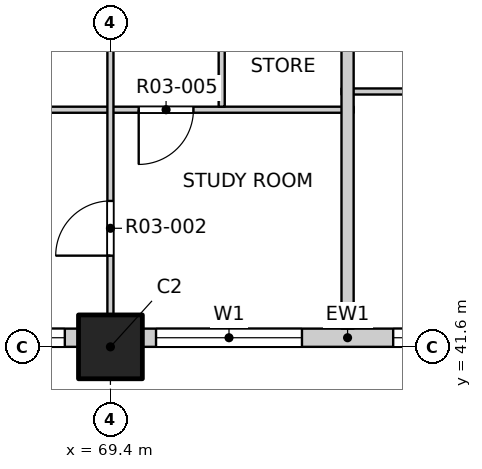
"""IFC4 building model, lengths in metres.
Left out: names, types, materials, properties, quantities, classifications, styles, units other than length and angle.
Written with IfcOpenShell. Run it as: python <this file> out.ifc"""

import sys

from ifc_helpers import new_model, si_unit, direction, frame, frame_2d, origin, origin_2d, place, context, subcontext, project, spatial, rectangle, extrude, element, fill, save


model = new_model("IFC4")
c1 = context("Model", 3, precision=1e-05, world=origin(), true_north=direction((0.0, 1.0)))
c2 = subcontext(c1, "Body", "Model", "MODEL_VIEW")
j1 = project(units=[si_unit("LENGTHUNIT", "METRE"), si_unit("PLANEANGLEUNIT", "RADIAN")], contexts=[c1])
p1 = place(None, origin())
s1 = spatial("IfcSite", under=j1, at=p1, CompositionType="ELEMENT")
p2 = place(p1, origin())
s2 = spatial("IfcBuilding", under=s1, at=p2, CompositionType="ELEMENT")
p3 = place(p2, frame((0.0, 0.0, 39.9)))
s3 = spatial("IfcBuildingStorey", under=s2, at=p3, CompositionType="ELEMENT", Elevation=39.9)
p4 = place(p3, frame((69.4, 41.6, -0.25), z_axis=(0.0, 0.0, 1.0), x_axis=(1.0, 0.0, 0.0)))
e1 = element("IfcColumn", 1, at=p4, inside=s3, PredefinedType="COLUMN", context=c2, shape_type="SweptSolid", body=[
    extrude(rectangle(XDim=1.05, YDim=1.05, at=origin_2d()), origin(), (0.0, 0.0, 1.0), 3.4),
])
p5 = place(p3, frame((65.5, 41.75, 0.0), z_axis=(0.0, 0.0, 1.0), x_axis=(1.0, 0.0, 0.0)))
e2 = element("IfcWall", 2, at=p5, inside=s3, PredefinedType="SOLIDWALL", context=c2, shape_type="SweptSolid", body=[
    extrude(rectangle(XDim=3.375, YDim=0.3, at=frame_2d((1.688, 0.0))), origin(), (0.0, 0.0, 1.0), 2.7),
])
p6 = place(p5, frame((0.75, 0.0, 0.9)))
e3 = element("IfcOpeningElement", 3, at=p6, cuts=e2, PredefinedType="OPENING", context=c2, shape_type="SweptSolid", body=[
    extrude(rectangle(XDim=2.4, YDim=1.8, at=frame_2d((1.2, 0.9))), frame((0.0, 0.16, 0.0), z_axis=(0.0, -1.0, 0.0), x_axis=(1.0, 0.0, 0.0)), (0.0, 0.0, 1.0), 0.32),
])
p7 = place(p3, frame((69.925, 41.75, 0.0), z_axis=(0.0, 0.0, 1.0), x_axis=(1.0, 0.0, 0.0)))
e4 = element("IfcWall", 4, at=p7, inside=s3, PredefinedType="SOLIDWALL", context=c2, shape_type="SweptSolid", body=[
    extrude(rectangle(XDim=6.75, YDim=0.3, at=frame_2d((3.375, 0.0))), origin(), (0.0, 0.0, 1.0), 2.7),
])
p8 = place(p7, frame((0.225, 0.0, 0.9)))
e5 = element("IfcOpeningElement", 5, at=p8, cuts=e4, PredefinedType="OPENING", context=c2, shape_type="SweptSolid", body=[
    extrude(rectangle(XDim=2.4, YDim=1.8, at=frame_2d((1.2, 0.9))), frame((0.0, 0.16, 0.0), z_axis=(0.0, -1.0, 0.0), x_axis=(1.0, 0.0, 0.0)), (0.0, 0.0, 1.0), 0.32),
])
p9 = place(p7, frame((4.125, 0.0, 0.9)))
e6 = element("IfcOpeningElement", 6, at=p9, cuts=e4, PredefinedType="OPENING", context=c2, shape_type="SweptSolid", body=[
    extrude(rectangle(XDim=2.4, YDim=1.8, at=frame_2d((1.2, 0.9))), frame((0.0, 0.16, 0.0), z_axis=(0.0, -1.0, 0.0), x_axis=(1.0, 0.0, 0.0)), (0.0, 0.0, 1.0), 0.32),
])
p10 = place(p3, frame((61.9, 45.5, 0.0), z_axis=(0.0, 0.0, 1.0), x_axis=(1.0, 0.0, 0.0)))
e7 = element("IfcWall", 7, at=p10, inside=s3, PredefinedType="PARTITIONING", context=c2, shape_type="SweptSolid", body=[
    extrude(rectangle(XDim=11.5, YDim=0.1, at=frame_2d((5.75, 0.0))), origin(), (0.0, 0.0, 1.0), 3.15),
])
p11 = place(p10, frame((7.965, 0.0, 0.0)))
e8 = element("IfcOpeningElement", 8, at=p11, cuts=e7, PredefinedType="OPENING", context=c2, shape_type="SweptSolid", body=[
    extrude(rectangle(XDim=0.9, YDim=2.1, at=frame_2d((0.45, 1.05))), frame((0.0, 0.06, 0.0), z_axis=(0.0, -1.0, 0.0), x_axis=(1.0, 0.0, 0.0)), (0.0, 0.0, 1.0), 0.12),
])
p12 = place(p3, frame((73.2, 45.8, 0.0), z_axis=(0.0, 0.0, 1.0), x_axis=(1.0, 0.0, 0.0)))
e9 = element("IfcWall", 9, at=p12, inside=s3, PredefinedType="PARTITIONING", context=c2, shape_type="SweptSolid", body=[
    extrude(rectangle(XDim=8.0, YDim=0.1, at=frame_2d((4.0, 0.0))), origin(), (0.0, 0.0, 1.0), 3.15),
])
p13 = place(p12, frame((1.45, 0.0, 0.0)))
e10 = element("IfcOpeningElement", 10, at=p13, cuts=e9, PredefinedType="OPENING", context=c2, shape_type="SweptSolid", body=[
    extrude(rectangle(XDim=1.2, YDim=2.1, at=frame_2d((0.6, 1.05))), frame((0.0, 0.06, 0.0), z_axis=(0.0, -1.0, 0.0), x_axis=(1.0, 0.0, 0.0)), (0.0, 0.0, 1.0), 0.12),
])
p14 = place(p12, frame((4.525, 0.0, 0.0)))
e11 = element("IfcOpeningElement", 11, at=p14, cuts=e9, PredefinedType="OPENING", context=c2, shape_type="SweptSolid", body=[
    extrude(rectangle(XDim=0.9, YDim=2.1, at=frame_2d((0.45, 1.05))), frame((0.0, 0.06, 0.0), z_axis=(0.0, -1.0, 0.0), x_axis=(1.0, 0.0, 0.0)), (0.0, 0.0, 1.0), 0.12),
])
p15 = place(p12, frame((6.475, 0.0, 0.0)))
e12 = element("IfcOpeningElement", 12, at=p15, cuts=e9, PredefinedType="OPENING", context=c2, shape_type="SweptSolid", body=[
    extrude(rectangle(XDim=0.9, YDim=2.1, at=frame_2d((0.45, 1.05))), frame((0.0, 0.06, 0.0), z_axis=(0.0, -1.0, 0.0), x_axis=(1.0, 0.0, 0.0)), (0.0, 0.0, 1.0), 0.12),
])
p16 = place(p3, frame((69.4, 41.9, 0.0), z_axis=(0.0, 0.0, 1.0), x_axis=(0.0, 1.0, 0.0)))
e13 = element("IfcWall", 13, at=p16, inside=s3, PredefinedType="PARTITIONING", context=c2, shape_type="SweptSolid", body=[
    extrude(rectangle(XDim=46.2, YDim=0.1, at=frame_2d((23.1, 0.0))), origin(), (0.0, 0.0, 1.0), 3.15),
])
p17 = place(p16, frame((1.2, 0.0, 0.0)))
e14 = element("IfcOpeningElement", 14, at=p17, cuts=e13, PredefinedType="OPENING", context=c2, shape_type="SweptSolid", body=[
    extrude(rectangle(XDim=0.9, YDim=2.1, at=frame_2d((0.45, 1.05))), frame((0.0, 0.06, 0.0), z_axis=(0.0, -1.0, 0.0), x_axis=(1.0, 0.0, 0.0)), (0.0, 0.0, 1.0), 0.12),
])
p18 = place(p16, frame((5.9, 0.0, 0.0)))
e15 = element("IfcOpeningElement", 15, at=p18, cuts=e13, PredefinedType="OPENING", context=c2, shape_type="SweptSolid", body=[
    extrude(rectangle(XDim=0.9, YDim=2.1, at=frame_2d((0.45, 1.05))), frame((0.0, 0.06, 0.0), z_axis=(0.0, -1.0, 0.0), x_axis=(1.0, 0.0, 0.0)), (0.0, 0.0, 1.0), 0.12),
])
p19 = place(p16, frame((9.0, 0.0, 0.0)))
e16 = element("IfcOpeningElement", 16, at=p19, cuts=e13, PredefinedType="OPENING", context=c2, shape_type="SweptSolid", body=[
    extrude(rectangle(XDim=0.9, YDim=2.1, at=frame_2d((0.45, 1.05))), frame((0.0, 0.06, 0.0), z_axis=(0.0, -1.0, 0.0), x_axis=(1.0, 0.0, 0.0)), (0.0, 0.0, 1.0), 0.12),
])
p20 = place(p16, frame((13.725, 0.0, 0.0)))
e17 = element("IfcOpeningElement", 17, at=p20, cuts=e13, PredefinedType="OPENING", context=c2, shape_type="SweptSolid", body=[
    extrude(rectangle(XDim=0.9, YDim=2.1, at=frame_2d((0.45, 1.05))), frame((0.0, 0.06, 0.0), z_axis=(0.0, -1.0, 0.0), x_axis=(1.0, 0.0, 0.0)), (0.0, 0.0, 1.0), 0.12),
])
p21 = place(p16, frame((17.775, 0.0, 0.0)))
e18 = element("IfcOpeningElement", 18, at=p21, cuts=e13, PredefinedType="OPENING", context=c2, shape_type="SweptSolid", body=[
    extrude(rectangle(XDim=0.9, YDim=2.1, at=frame_2d((0.45, 1.05))), frame((0.0, 0.06, 0.0), z_axis=(0.0, -1.0, 0.0), x_axis=(1.0, 0.0, 0.0)), (0.0, 0.0, 1.0), 0.12),
])
p22 = place(p16, frame((20.7, 0.0, 0.0)))
e19 = element("IfcOpeningElement", 19, at=p22, cuts=e13, PredefinedType="OPENING", context=c2, shape_type="SweptSolid", body=[
    extrude(rectangle(XDim=0.9, YDim=2.1, at=frame_2d((0.45, 1.05))), frame((0.0, 0.06, 0.0), z_axis=(0.0, -1.0, 0.0), x_axis=(1.0, 0.0, 0.0)), (0.0, 0.0, 1.0), 0.12),
])
p23 = place(p16, frame((25.575, 0.0, 0.0)))
e20 = element("IfcOpeningElement", 20, at=p23, cuts=e13, PredefinedType="OPENING", context=c2, shape_type="SweptSolid", body=[
    extrude(rectangle(XDim=0.9, YDim=2.1, at=frame_2d((0.45, 1.05))), frame((0.0, 0.06, 0.0), z_axis=(0.0, -1.0, 0.0), x_axis=(1.0, 0.0, 0.0)), (0.0, 0.0, 1.0), 0.12),
])
p24 = place(p16, frame((28.5, 0.0, 0.0)))
e21 = element("IfcOpeningElement", 21, at=p24, cuts=e13, PredefinedType="OPENING", context=c2, shape_type="SweptSolid", body=[
    extrude(rectangle(XDim=0.9, YDim=2.1, at=frame_2d((0.45, 1.05))), frame((0.0, 0.06, 0.0), z_axis=(0.0, -1.0, 0.0), x_axis=(1.0, 0.0, 0.0)), (0.0, 0.0, 1.0), 0.12),
])
p25 = place(p16, frame((33.375, 0.0, 0.0)))
e22 = element("IfcOpeningElement", 22, at=p25, cuts=e13, PredefinedType="OPENING", context=c2, shape_type="SweptSolid", body=[
    extrude(rectangle(XDim=0.9, YDim=2.1, at=frame_2d((0.45, 1.05))), frame((0.0, 0.06, 0.0), z_axis=(0.0, -1.0, 0.0), x_axis=(1.0, 0.0, 0.0)), (0.0, 0.0, 1.0), 0.12),
])
p26 = place(p16, frame((36.3, 0.0, 0.0)))
e23 = element("IfcOpeningElement", 23, at=p26, cuts=e13, PredefinedType="OPENING", context=c2, shape_type="SweptSolid", body=[
    extrude(rectangle(XDim=0.9, YDim=2.1, at=frame_2d((0.45, 1.05))), frame((0.0, 0.06, 0.0), z_axis=(0.0, -1.0, 0.0), x_axis=(1.0, 0.0, 0.0)), (0.0, 0.0, 1.0), 0.12),
])
p27 = place(p16, frame((40.2, 0.0, 0.0)))
e24 = element("IfcOpeningElement", 24, at=p27, cuts=e13, PredefinedType="OPENING", context=c2, shape_type="SweptSolid", body=[
    extrude(rectangle(XDim=0.9, YDim=2.1, at=frame_2d((0.45, 1.05))), frame((0.0, 0.06, 0.0), z_axis=(0.0, -1.0, 0.0), x_axis=(1.0, 0.0, 0.0)), (0.0, 0.0, 1.0), 0.12),
])
p28 = place(p16, frame((44.1, 0.0, 0.0)))
e25 = element("IfcOpeningElement", 25, at=p28, cuts=e13, PredefinedType="OPENING", context=c2, shape_type="SweptSolid", body=[
    extrude(rectangle(XDim=0.9, YDim=2.1, at=frame_2d((0.45, 1.05))), frame((0.0, 0.06, 0.0), z_axis=(0.0, -1.0, 0.0), x_axis=(1.0, 0.0, 0.0)), (0.0, 0.0, 1.0), 0.12),
])
p29 = place(p3, frame((71.23, 45.55, 0.0), z_axis=(0.0, 0.0, 1.0), x_axis=(0.0, 1.0, 0.0)))
e26 = element("IfcWall", 26, at=p29, inside=s3, PredefinedType="PARTITIONING", context=c2, shape_type="SweptSolid", body=[
    extrude(rectangle(XDim=12.3, YDim=0.1, at=frame_2d((6.15, 0.0))), origin(), (0.0, 0.0, 1.0), 3.15),
])
p30 = place(p29, frame((1.0, 0.0, 0.0)))
e27 = element("IfcOpeningElement", 27, at=p30, cuts=e26, PredefinedType="OPENING", context=c2, shape_type="SweptSolid", body=[
    extrude(rectangle(XDim=0.8, YDim=2.1, at=frame_2d((0.4, 1.05))), frame((0.0, 0.06, 0.0), z_axis=(0.0, -1.0, 0.0), x_axis=(1.0, 0.0, 0.0)), (0.0, 0.0, 1.0), 0.12),
])
p31 = place(p29, frame((3.35, 0.0, 0.0)))
e28 = element("IfcOpeningElement", 28, at=p31, cuts=e26, PredefinedType="OPENING", context=c2, shape_type="SweptSolid", body=[
    extrude(rectangle(XDim=0.9, YDim=2.1, at=frame_2d((0.45, 1.05))), frame((0.0, 0.06, 0.0), z_axis=(0.0, -1.0, 0.0), x_axis=(1.0, 0.0, 0.0)), (0.0, 0.0, 1.0), 0.12),
])
p32 = place(p29, frame((5.8, 0.0, 0.0)))
e29 = element("IfcOpeningElement", 29, at=p32, cuts=e26, PredefinedType="OPENING", context=c2, shape_type="SweptSolid", body=[
    extrude(rectangle(XDim=0.8, YDim=2.1, at=frame_2d((0.4, 1.05))), frame((0.0, 0.06, 0.0), z_axis=(0.0, -1.0, 0.0), x_axis=(1.0, 0.0, 0.0)), (0.0, 0.0, 1.0), 0.12),
])
p33 = place(p29, frame((8.4, 0.0, 0.0)))
e30 = element("IfcOpeningElement", 30, at=p33, cuts=e26, PredefinedType="OPENING", context=c2, shape_type="SweptSolid", body=[
    extrude(rectangle(XDim=0.8, YDim=2.1, at=frame_2d((0.4, 1.05))), frame((0.0, 0.06, 0.0), z_axis=(0.0, -1.0, 0.0), x_axis=(1.0, 0.0, 0.0)), (0.0, 0.0, 1.0), 0.12),
])
p34 = place(p29, frame((10.7, 0.0, 0.0)))
e31 = element("IfcOpeningElement", 31, at=p34, cuts=e26, PredefinedType="OPENING", context=c2, shape_type="SweptSolid", body=[
    extrude(rectangle(XDim=0.9, YDim=2.1, at=frame_2d((0.45, 1.05))), frame((0.0, 0.06, 0.0), z_axis=(0.0, -1.0, 0.0), x_axis=(1.0, 0.0, 0.0)), (0.0, 0.0, 1.0), 0.12),
])
p35 = place(p3, frame((73.3, 41.9, 0.0), z_axis=(0.0, 0.0, 1.0), x_axis=(0.0, 1.0, 0.0)))
e32 = element("IfcWall", 32, at=p35, inside=s3, PredefinedType="PARTITIONING", context=c2, shape_type="SweptSolid", body=[
    extrude(rectangle(XDim=11.3, YDim=0.2, at=frame_2d((5.65, 0.0))), origin(), (0.0, 0.0, 1.0), 3.15),
])
p36 = place(p6, origin())
e33 = element("IfcWindow", 33, at=p36, inside=s3, PartitioningType="DOUBLE_PANEL_VERTICAL", PredefinedType="WINDOW", context=c2, shape_type="SweptSolid", body=[
    extrude(rectangle(XDim=2.4, YDim=1.8, at=frame_2d((1.2, 0.9))), frame((0.0, 0.03, 0.0), z_axis=(0.0, -1.0, 0.0), x_axis=(1.0, 0.0, 0.0)), (0.0, 0.0, 1.0), 0.06),
])
fill(e3, e33)
p37 = place(p8, origin())
e34 = element("IfcWindow", 34, at=p37, inside=s3, PartitioningType="DOUBLE_PANEL_VERTICAL", PredefinedType="WINDOW", context=c2, shape_type="SweptSolid", body=[
    extrude(rectangle(XDim=2.4, YDim=1.8, at=frame_2d((1.2, 0.9))), frame((0.0, 0.03, 0.0), z_axis=(0.0, -1.0, 0.0), x_axis=(1.0, 0.0, 0.0)), (0.0, 0.0, 1.0), 0.06),
])
fill(e5, e34)
p38 = place(p9, origin())
e35 = element("IfcWindow", 35, at=p38, inside=s3, PartitioningType="DOUBLE_PANEL_VERTICAL", PredefinedType="WINDOW", context=c2, shape_type="SweptSolid", body=[
    extrude(rectangle(XDim=2.4, YDim=1.8, at=frame_2d((1.2, 0.9))), frame((0.0, 0.03, 0.0), z_axis=(0.0, -1.0, 0.0), x_axis=(1.0, 0.0, 0.0)), (0.0, 0.0, 1.0), 0.06),
])
fill(e6, e35)
p39 = place(p17, origin())
e36 = element("IfcDoor", 36, at=p39, inside=s3, OperationType="SINGLE_SWING_LEFT", PredefinedType="DOOR", context=c2, shape_type="SweptSolid", body=[
    extrude(rectangle(XDim=0.9, YDim=2.1, at=frame_2d((0.45, 1.05))), frame((0.0, 0.025, 0.0), z_axis=(0.0, -1.0, 0.0), x_axis=(1.0, 0.0, 0.0)), (0.0, 0.0, 1.0), 0.05),
])
fill(e14, e36)
p40 = place(p11, origin())
e37 = element("IfcDoor", 37, at=p40, inside=s3, OperationType="SINGLE_SWING_RIGHT", PredefinedType="DOOR", context=c2, shape_type="SweptSolid", body=[
    extrude(rectangle(XDim=0.9, YDim=2.1, at=frame_2d((0.45, 1.05))), frame((0.0, 0.025, 0.0), z_axis=(0.0, -1.0, 0.0), x_axis=(1.0, 0.0, 0.0)), (0.0, 0.0, 1.0), 0.05),
])
fill(e8, e37)
save(model, sys.argv[1])
